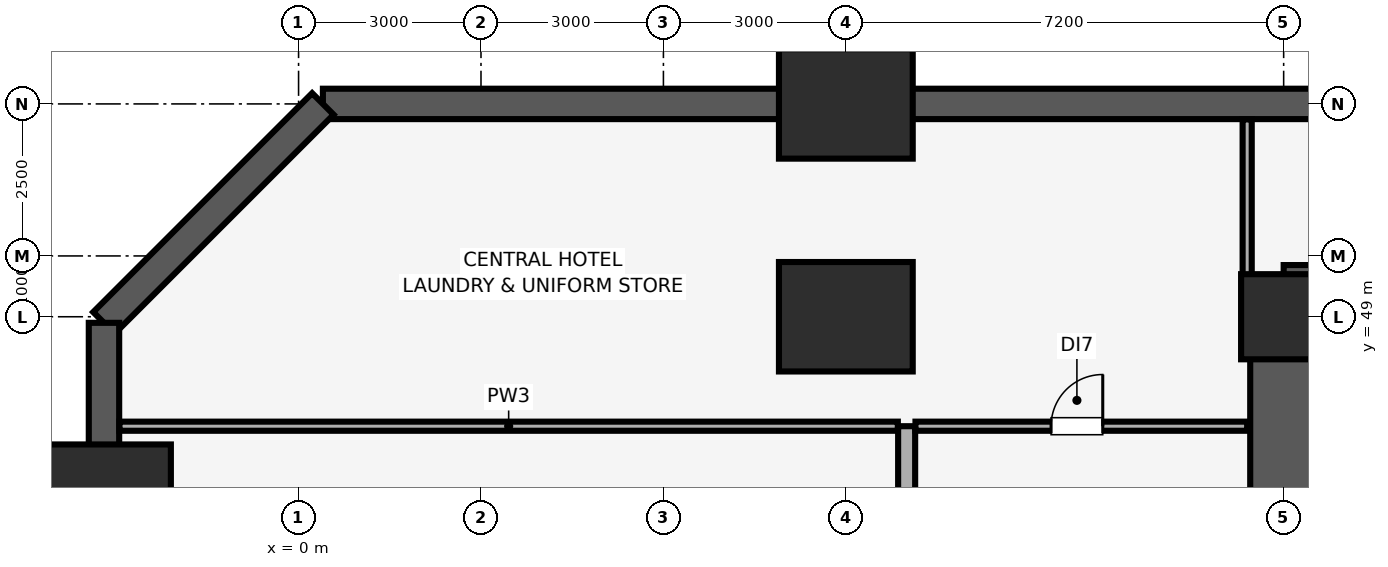
"""IFC4 building model, lengths in metres.
Left out: names, types, materials, properties, quantities, classifications, styles, units other than length and angle.
Written with IfcOpenShell. Run it as: python <this file> out.ifc"""

import sys

from ifc_helpers import new_model, si_unit, direction, frame, frame_2d, origin, origin_2d, place, context, subcontext, project, spatial, rectangle, extrude, element, fill, save


model = new_model("IFC4")
c1 = context("Model", 3, precision=1e-05, world=origin(), true_north=direction((0.0, 1.0)))
c2 = subcontext(c1, "Body", "Model", "MODEL_VIEW")
j1 = project(units=[si_unit("LENGTHUNIT", "METRE"), si_unit("PLANEANGLEUNIT", "RADIAN")], contexts=[c1])
p1 = place(None, origin())
s1 = spatial("IfcSite", under=j1, at=p1, CompositionType="ELEMENT")
p2 = place(p1, origin())
s2 = spatial("IfcBuilding", under=s1, at=p2, CompositionType="ELEMENT")
p3 = place(p2, frame((0.0, 0.0, -4.6)))
s3 = spatial("IfcBuildingStorey", under=s2, at=p3, CompositionType="ELEMENT", Elevation=-4.6)
for number, where, z_axis, x_axis in (
    (1, (-3.2, 46.0, 0.0), (0.0, 0.0, 1.0), (1.0, 0.0, 0.0)),
    (2, (9.0, 49.0, 0.0), (0.0, 0.0, 1.0), (1.0, 0.0, 0.0)),
    (3, (9.0, 52.5, 0.0), (0.0, 0.0, 1.0), (1.0, 0.0, 0.0)),
):
    element("IfcColumn", number, at=place(p3, frame(where, z_axis=z_axis, x_axis=x_axis)), inside=s3, PredefinedType="USERDEFINED", context=c2, shape_type="SweptSolid", body=[
        extrude(rectangle(XDim=2.2, YDim=1.8, at=origin_2d()), origin(), (0.0, 0.0, 1.0), 4.25),
    ])
p4 = place(p3, frame((16.2, 49.0, 0.0), z_axis=(0.0, 0.0, 1.0), x_axis=(1.0, 0.0, 0.0)))
e4 = element("IfcColumn", 4, at=p4, inside=s3, PredefinedType="COLUMN", context=c2, shape_type="SweptSolid", body=[
    extrude(rectangle(XDim=1.4, YDim=1.4, at=origin_2d()), origin(), (0.0, 0.0, 1.0), 4.25),
])
p5 = place(p3, frame((83.6, 52.5, 0.0), z_axis=(0.0, 0.0, 1.0), x_axis=(-1.0, 0.0, 0.0)))
e5 = element("IfcWall", 5, at=p5, inside=s3, PredefinedType="USERDEFINED", context=c2, shape_type="SweptSolid", body=[
    extrude(rectangle(XDim=83.2, YDim=0.5, at=frame_2d((41.6, 0.0))), origin(), (0.0, 0.0, 1.0), 4.25),
])
p6 = place(p3, frame((0.4, 52.5, 0.0), z_axis=(0.0, 0.0, 1.0), x_axis=(-0.707082803744, -0.707130757816, 0.0)))
e6 = element("IfcWall", 6, at=p6, inside=s3, PredefinedType="USERDEFINED", context=c2, shape_type="SweptSolid", body=[
    extrude(rectangle(XDim=5.091, YDim=0.5, at=frame_2d((2.545, 0.0))), origin(), (0.0, 0.0, 1.0), 4.25),
])
p7 = place(p3, frame((-3.2, 48.9, 0.0), z_axis=(0.0, 0.0, 1.0), x_axis=(0.0, -1.0, 0.0)))
e7 = element("IfcWall", 7, at=p7, inside=s3, PredefinedType="USERDEFINED", context=c2, shape_type="SweptSolid", body=[
    extrude(rectangle(XDim=47.8, YDim=0.5, at=frame_2d((23.9, 0.0))), origin(), (0.0, 0.0, 1.0), 4.25),
])
p8 = place(p3, frame((10.0, 39.0, 0.0), z_axis=(0.0, 0.0, 1.0), x_axis=(0.0, 1.0, 0.0)))
e8 = element("IfcWall", 8, at=p8, inside=s3, PredefinedType="SOLIDWALL", context=c2, shape_type="SweptSolid", body=[
    extrude(rectangle(XDim=8.2, YDim=0.28, at=frame_2d((4.1, 0.0))), origin(), (0.0, 0.0, 1.0), 4.25),
])
p9 = place(p3, frame((16.2, 49.3, 0.0), z_axis=(0.0, 0.0, 1.0), x_axis=(1.0, 0.0, 0.0)))
e9 = element("IfcWall", 9, at=p9, inside=s3, PredefinedType="SHEAR", context=c2, shape_type="SweptSolid", body=[
    extrude(rectangle(XDim=51.6, YDim=1.1, at=frame_2d((25.8, 0.0))), origin(), (0.0, 0.0, 1.0), 4.25),
])
p10 = place(p3, frame((16.2, 29.4, 0.0), z_axis=(0.0, 0.0, 1.0), x_axis=(0.0, 1.0, 0.0)))
e10 = element("IfcWall", 10, at=p10, inside=s3, PredefinedType="SHEAR", context=c2, shape_type="SweptSolid", body=[
    extrude(rectangle(XDim=19.2, YDim=1.1, at=frame_2d((9.6, 0.0))), origin(), (0.0, 0.0, 1.0), 4.25),
])
p11 = place(p3, frame((-2.945, 47.2, 0.0), z_axis=(0.0, 0.0, 1.0), x_axis=(1.0, 0.0, 0.0)))
e11 = element("IfcWall", 11, at=p11, inside=s3, PredefinedType="PARTITIONING", context=c2, shape_type="SweptSolid", body=[
    extrude(rectangle(XDim=12.8, YDim=0.15, at=frame_2d((6.4, 0.0))), origin(), (0.0, 0.0, 1.0), 4.25),
])
p12 = place(p3, frame((10.145, 47.2, 0.0), z_axis=(0.0, 0.0, 1.0), x_axis=(1.0, 0.0, 0.0)))
e12 = element("IfcWall", 12, at=p12, inside=s3, PredefinedType="PARTITIONING", context=c2, shape_type="SweptSolid", body=[
    extrude(rectangle(XDim=5.455, YDim=0.15, at=frame_2d((2.728, 0.0))), origin(), (0.0, 0.0, 1.0), 4.25),
])
p13 = place(p12, frame((2.23, 0.0, 0.0)))
e13 = element("IfcOpeningElement", 13, at=p13, cuts=e12, PredefinedType="OPENING", context=c2, shape_type="SweptSolid", body=[
    extrude(rectangle(XDim=0.85, YDim=2.1, at=frame_2d((0.425, 1.05))), frame((0.0, 0.085, 0.0), z_axis=(0.0, -1.0, 0.0), x_axis=(1.0, 0.0, 0.0)), (0.0, 0.0, 1.0), 0.17),
])
p14 = place(p3, frame((15.6, 48.61, 0.0), z_axis=(0.0, 0.0, 1.0), x_axis=(0.0, 1.0, 0.0)))
e14 = element("IfcWall", 14, at=p14, inside=s3, PredefinedType="PARTITIONING", context=c2, shape_type="SweptSolid", body=[
    extrude(rectangle(XDim=3.635, YDim=0.15, at=frame_2d((1.817, 0.0))), origin(), (0.0, 0.0, 1.0), 4.25),
])
p15 = place(p13, origin())
e15 = element("IfcDoor", 15, at=p15, inside=s3, OperationType="SINGLE_SWING_RIGHT", PredefinedType="DOOR", context=c2, shape_type="SweptSolid", body=[
    extrude(rectangle(XDim=0.85, YDim=2.1, at=frame_2d((0.425, 1.05))), frame((0.0, 0.025, 0.0), z_axis=(0.0, -1.0, 0.0), x_axis=(1.0, 0.0, 0.0)), (0.0, 0.0, 1.0), 0.05),
])
fill(e13, e15)
save(model, sys.argv[1])
